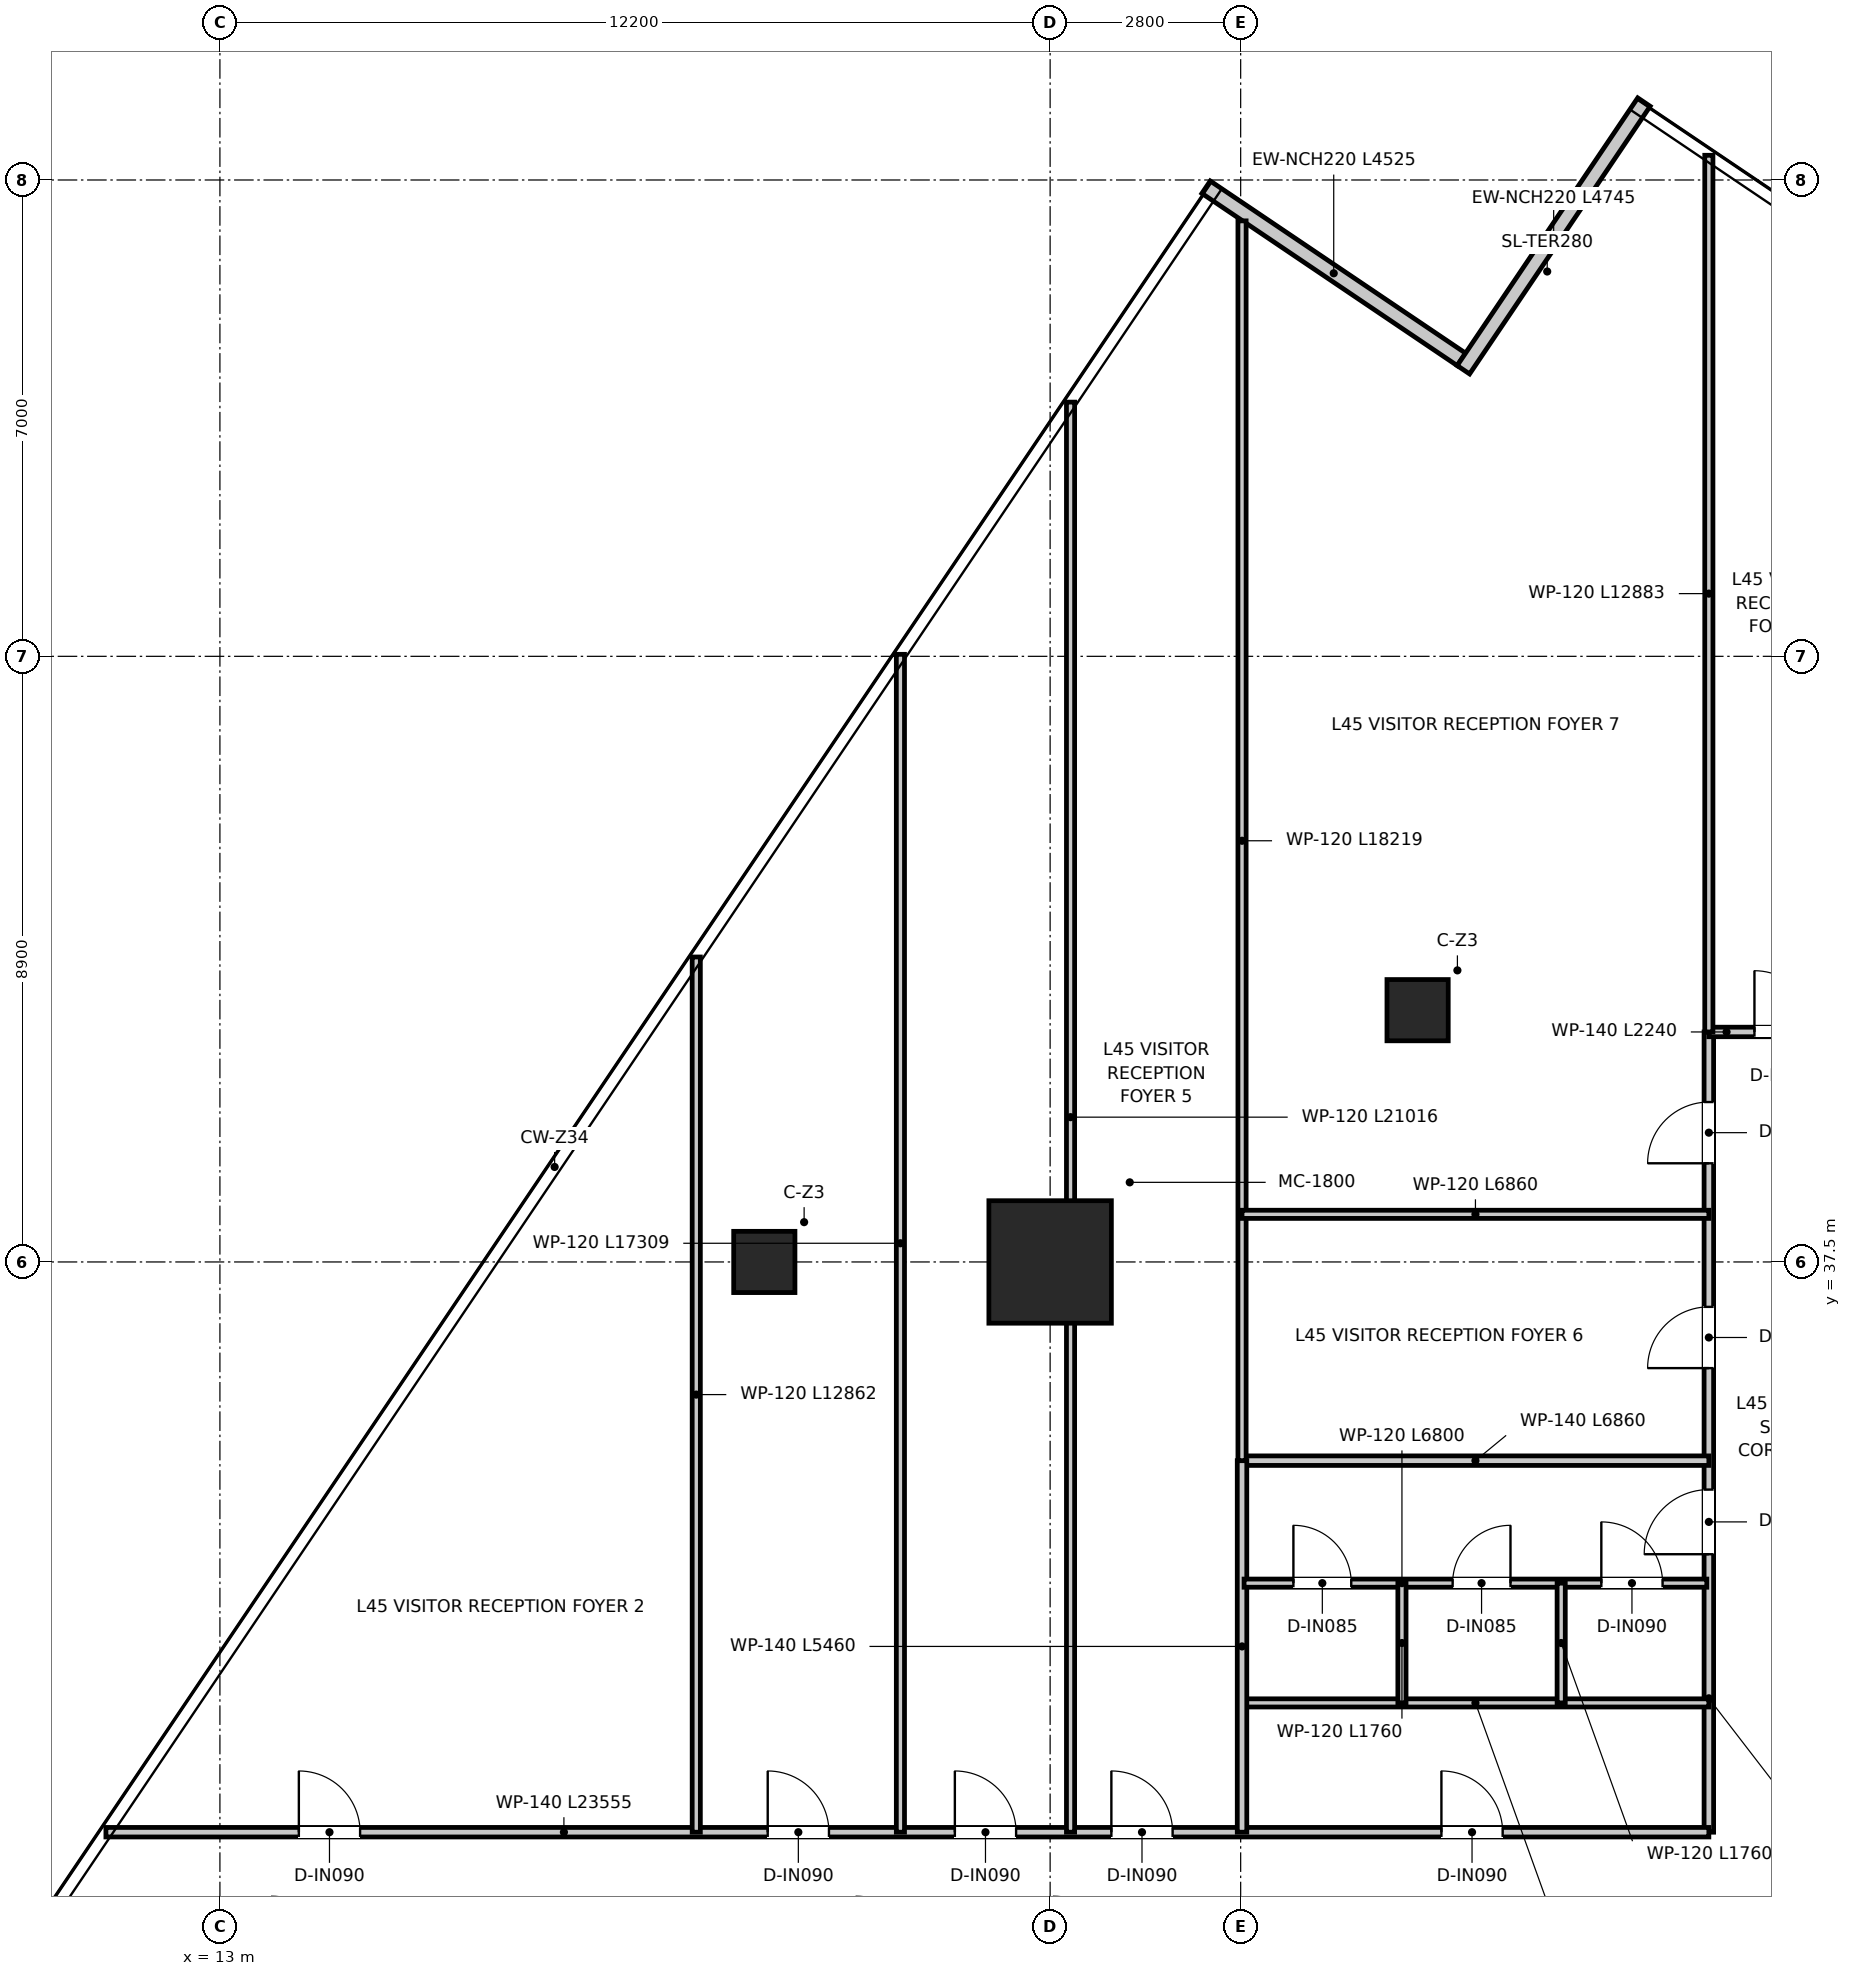
"""IFC4 building model, lengths in metres.
Left out: names, types, materials, properties, quantities, classifications, styles, units other than length and angle.
Written with IfcOpenShell. Run it as: python <this file> out.ifc"""

import sys

from ifc_helpers import new_model, si_unit, direction, frame, frame_2d, origin, origin_2d, place, context, subcontext, project, spatial, rectangle, extrude, source, transform, mapped, element, fill, save


model = new_model("IFC4")
c1 = context("Model", 3, precision=1e-05, world=origin(), true_north=direction((0.0, 1.0)))
c2 = subcontext(c1, "Body", "Model", "MODEL_VIEW")
j1 = project(units=[si_unit("LENGTHUNIT", "METRE"), si_unit("PLANEANGLEUNIT", "RADIAN")], contexts=[c1])
p1 = place(None, origin())
s1 = spatial("IfcSite", under=j1, at=p1, CompositionType="ELEMENT")
p2 = place(p1, origin())
s2 = spatial("IfcBuilding", under=s1, at=p2, CompositionType="ELEMENT")
p3 = place(p2, frame((0.0, 0.0, 185.7)))
s3 = spatial("IfcBuildingStorey", under=s2, at=p3, CompositionType="ELEMENT", Elevation=185.7)
m1 = source(origin(), c2, "Body", "SweptSolid", [
    extrude(rectangle(XDim=1.8, YDim=1.8, at=origin_2d()), origin(), (0.0, 0.0, 1.0), 3.95),
])
p4 = place(p3, frame((25.2, 37.5, 0.0), z_axis=(0.0, 0.0, 1.0), x_axis=(1.0, 0.0, 0.0)))
e1 = element("IfcColumn", 1, at=p4, inside=s3, PredefinedType="USERDEFINED", context=c2, shape_type="MappedRepresentation", body=[
    mapped(m1, transform((0.0, 0.0, 0.0), x_axis=(1.0, 0.0, 0.0), y_axis=(0.0, 1.0, 0.0), z_axis=(0.0, 0.0, 1.0), scale=1.0)),
])
m2 = source(origin(), c2, "Body", "SweptSolid", [
    extrude(rectangle(XDim=0.9, YDim=0.9, at=origin_2d()), origin(), (0.0, 0.0, 1.0), 3.95),
])
for number, where, z_axis, x_axis in (
    (2, (21.0, 37.5, 0.0), (0.0, 0.0, 1.0), (1.0, 0.0, 0.0)),
    (3, (30.6, 41.2, 0.0), (0.0, 0.0, 1.0), (1.0, 0.0, 0.0)),
):
    element("IfcColumn", number, at=place(p3, frame(where, z_axis=z_axis, x_axis=x_axis)), inside=s3, PredefinedType="COLUMN", context=c2, shape_type="MappedRepresentation", body=[
        mapped(m2, transform((0.0, 0.0, 0.0), x_axis=(1.0, 0.0, 0.0), y_axis=(0.0, 1.0, 0.0), z_axis=(0.0, 0.0, 1.0), scale=1.0)),
    ])
p5 = place(p3, frame((31.243, 50.764, 0.0), z_axis=(0.0, 0.0, 1.0), x_axis=(-0.829025013232, 0.559211522982, 0.0)))
e4 = element("IfcWall", 4, at=p5, inside=s3, PredefinedType="ELEMENTEDWALL", context=c2, shape_type="SweptSolid", body=[
    extrude(rectangle(XDim=4.525, YDim=0.22, at=frame_2d((2.263, 0.0))), origin(), (0.0, 0.0, 1.0), 3.67),
])
p6 = place(p3, frame((33.926, 54.545, 0.0), z_axis=(0.0, 0.0, 1.0), x_axis=(-0.559180323614, -0.829046057637, 0.0)))
e5 = element("IfcWall", 5, at=p6, inside=s3, PredefinedType="ELEMENTEDWALL", context=c2, shape_type="SweptSolid", body=[
    extrude(rectangle(XDim=4.745, YDim=0.22, at=frame_2d((2.373, 0.0))), origin(), (0.0, 0.0, 1.0), 3.67),
])
p7 = place(p3, frame((34.88, 29.12, 0.0), z_axis=(0.0, 0.0, 1.0), x_axis=(0.0, 1.0, 0.0)))
e6 = element("IfcWall", 6, at=p7, inside=s3, PredefinedType="PARTITIONING", context=c2, shape_type="SweptSolid", body=[
    extrude(rectangle(XDim=11.76, YDim=0.14, at=frame_2d((5.88, 0.0))), origin(), (0.0, 0.0, 1.0), 3.03),
])
p8 = place(p7, frame((4.085, 0.0, 0.0)))
e7 = element("IfcOpeningElement", 7, at=p8, cuts=e6, PredefinedType="OPENING", context=c2, shape_type="SweptSolid", body=[
    extrude(rectangle(XDim=0.95, YDim=2.1, at=frame_2d((0.475, 1.05))), frame((0.0, 0.08, 0.0), z_axis=(0.0, -1.0, 0.0), x_axis=(1.0, 0.0, 0.0)), (0.0, 0.0, 1.0), 0.16),
])
p9 = place(p7, frame((6.82, 0.0, 0.0)))
e8 = element("IfcOpeningElement", 8, at=p9, cuts=e6, PredefinedType="OPENING", context=c2, shape_type="SweptSolid", body=[
    extrude(rectangle(XDim=0.9, YDim=2.1, at=frame_2d((0.45, 1.05))), frame((0.0, 0.08, 0.0), z_axis=(0.0, -1.0, 0.0), x_axis=(1.0, 0.0, 0.0)), (0.0, 0.0, 1.0), 0.16),
])
p10 = place(p7, frame((9.83, 0.0, 0.0)))
e9 = element("IfcOpeningElement", 9, at=p10, cuts=e6, PredefinedType="OPENING", context=c2, shape_type="SweptSolid", body=[
    extrude(rectangle(XDim=0.9, YDim=2.1, at=frame_2d((0.45, 1.05))), frame((0.0, 0.08, 0.0), z_axis=(0.0, -1.0, 0.0), x_axis=(1.0, 0.0, 0.0)), (0.0, 0.0, 1.0), 0.16),
])
p11 = place(p3, frame((34.88, 40.88, 0.0), z_axis=(0.0, 0.0, 1.0), x_axis=(1.0, 0.0, 0.0)))
e10 = element("IfcWall", 10, at=p11, inside=s3, PredefinedType="PARTITIONING", context=c2, shape_type="SweptSolid", body=[
    extrude(rectangle(XDim=2.24, YDim=0.14, at=frame_2d((1.12, 0.0))), origin(), (0.0, 0.0, 1.0), 3.67),
])
p12 = place(p11, frame((0.67, 0.0, 0.0)))
e11 = element("IfcOpeningElement", 11, at=p12, cuts=e10, PredefinedType="OPENING", context=c2, shape_type="SweptSolid", body=[
    extrude(rectangle(XDim=0.9, YDim=2.1, at=frame_2d((0.45, 1.05))), frame((0.0, 0.08, 0.0), z_axis=(0.0, -1.0, 0.0), x_axis=(1.0, 0.0, 0.0)), (0.0, 0.0, 1.0), 0.16),
])
p13 = place(p3, frame((11.325, 29.12, 0.0), z_axis=(0.0, 0.0, 1.0), x_axis=(1.0, 0.0, 0.0)))
e12 = element("IfcWall", 12, at=p13, inside=s3, PredefinedType="PARTITIONING", context=c2, shape_type="SweptSolid", body=[
    extrude(rectangle(XDim=23.555, YDim=0.14, at=frame_2d((11.778, 0.0))), origin(), (0.0, 0.0, 1.0), 3.03),
])
p14 = place(p13, frame((19.625, 0.0, 0.0)))
e13 = element("IfcOpeningElement", 13, at=p14, cuts=e12, PredefinedType="OPENING", context=c2, shape_type="SweptSolid", body=[
    extrude(rectangle(XDim=0.9, YDim=2.1, at=frame_2d((0.45, 1.05))), frame((0.0, 0.08, 0.0), z_axis=(0.0, -1.0, 0.0), x_axis=(1.0, 0.0, 0.0)), (0.0, 0.0, 1.0), 0.16),
])
p15 = place(p13, frame((2.835, 0.0, 0.0)))
e14 = element("IfcOpeningElement", 14, at=p15, cuts=e12, PredefinedType="OPENING", context=c2, shape_type="SweptSolid", body=[
    extrude(rectangle(XDim=0.9, YDim=2.1, at=frame_2d((0.45, 1.05))), frame((0.0, 0.08, 0.0), z_axis=(0.0, -1.0, 0.0), x_axis=(1.0, 0.0, 0.0)), (0.0, 0.0, 1.0), 0.16),
])
p16 = place(p13, frame((9.725, 0.0, 0.0)))
e15 = element("IfcOpeningElement", 15, at=p16, cuts=e12, PredefinedType="OPENING", context=c2, shape_type="SweptSolid", body=[
    extrude(rectangle(XDim=0.9, YDim=2.1, at=frame_2d((0.45, 1.05))), frame((0.0, 0.08, 0.0), z_axis=(0.0, -1.0, 0.0), x_axis=(1.0, 0.0, 0.0)), (0.0, 0.0, 1.0), 0.16),
])
p17 = place(p13, frame((12.475, 0.0, 0.0)))
e16 = element("IfcOpeningElement", 16, at=p17, cuts=e12, PredefinedType="OPENING", context=c2, shape_type="SweptSolid", body=[
    extrude(rectangle(XDim=0.9, YDim=2.1, at=frame_2d((0.45, 1.05))), frame((0.0, 0.08, 0.0), z_axis=(0.0, -1.0, 0.0), x_axis=(1.0, 0.0, 0.0)), (0.0, 0.0, 1.0), 0.16),
])
p18 = place(p13, frame((14.775, 0.0, 0.0)))
e17 = element("IfcOpeningElement", 17, at=p18, cuts=e12, PredefinedType="OPENING", context=c2, shape_type="SweptSolid", body=[
    extrude(rectangle(XDim=0.9, YDim=2.1, at=frame_2d((0.45, 1.05))), frame((0.0, 0.08, 0.0), z_axis=(0.0, -1.0, 0.0), x_axis=(1.0, 0.0, 0.0)), (0.0, 0.0, 1.0), 0.16),
])
p19 = place(p3, frame((28.02, 31.02, 0.0), z_axis=(0.0, 0.0, 1.0), x_axis=(1.0, 0.0, 0.0)))
e18 = element("IfcWall", 18, at=p19, inside=s3, PredefinedType="PARTITIONING", context=c2, shape_type="SweptSolid", body=[
    extrude(rectangle(XDim=6.86, YDim=0.12, at=frame_2d((3.43, 0.0))), origin(), (0.0, 0.0, 1.0), 3.08),
])
p20 = place(p3, frame((28.02, 34.58, 0.0), z_axis=(0.0, 0.0, 1.0), x_axis=(1.0, 0.0, 0.0)))
e19 = element("IfcWall", 19, at=p20, inside=s3, PredefinedType="PARTITIONING", context=c2, shape_type="SweptSolid", body=[
    extrude(rectangle(XDim=6.86, YDim=0.14, at=frame_2d((3.43, 0.0))), origin(), (0.0, 0.0, 1.0), 3.08),
])
p21 = place(p3, frame((28.02, 29.12, 0.0), z_axis=(0.0, 0.0, 1.0), x_axis=(0.0, 1.0, 0.0)))
e20 = element("IfcWall", 20, at=p21, inside=s3, PredefinedType="PARTITIONING", context=c2, shape_type="SweptSolid", body=[
    extrude(rectangle(XDim=5.46, YDim=0.14, at=frame_2d((2.73, 0.0))), origin(), (0.0, 0.0, 1.0), 3.31),
])
p22 = place(p3, frame((28.05, 32.78, 0.0), z_axis=(0.0, 0.0, 1.0), x_axis=(1.0, 0.0, 0.0)))
e21 = element("IfcWall", 21, at=p22, inside=s3, PredefinedType="PARTITIONING", context=c2, shape_type="SweptSolid", body=[
    extrude(rectangle(XDim=6.8, YDim=0.12, at=frame_2d((3.4, 0.0))), origin(), (0.0, 0.0, 1.0), 3.08),
])
p23 = place(p22, frame((0.725, 0.0, 0.0)))
e22 = element("IfcOpeningElement", 22, at=p23, cuts=e21, PredefinedType="OPENING", context=c2, shape_type="SweptSolid", body=[
    extrude(rectangle(XDim=0.85, YDim=2.1, at=frame_2d((0.425, 1.05))), frame((0.0, 0.07, 0.0), z_axis=(0.0, -1.0, 0.0), x_axis=(1.0, 0.0, 0.0)), (0.0, 0.0, 1.0), 0.14),
])
p24 = place(p22, frame((3.065, 0.0, 0.0)))
e23 = element("IfcOpeningElement", 23, at=p24, cuts=e21, PredefinedType="OPENING", context=c2, shape_type="SweptSolid", body=[
    extrude(rectangle(XDim=0.85, YDim=2.1, at=frame_2d((0.425, 1.05))), frame((0.0, 0.07, 0.0), z_axis=(0.0, -1.0, 0.0), x_axis=(1.0, 0.0, 0.0)), (0.0, 0.0, 1.0), 0.14),
])
p25 = place(p22, frame((5.25, 0.0, 0.0)))
e24 = element("IfcOpeningElement", 24, at=p25, cuts=e21, PredefinedType="OPENING", context=c2, shape_type="SweptSolid", body=[
    extrude(rectangle(XDim=0.9, YDim=2.1, at=frame_2d((0.45, 1.05))), frame((0.0, 0.07, 0.0), z_axis=(0.0, -1.0, 0.0), x_axis=(1.0, 0.0, 0.0)), (0.0, 0.0, 1.0), 0.14),
])
p26 = place(p3, frame((30.37, 31.02, 0.0), z_axis=(0.0, 0.0, 1.0), x_axis=(0.0, 1.0, 0.0)))
e25 = element("IfcWall", 25, at=p26, inside=s3, PredefinedType="PARTITIONING", context=c2, shape_type="SweptSolid", body=[
    extrude(rectangle(XDim=1.76, YDim=0.12, at=frame_2d((0.88, 0.0))), origin(), (0.0, 0.0, 1.0), 3.08),
])
p27 = place(p3, frame((32.71, 31.02, 0.0), z_axis=(0.0, 0.0, 1.0), x_axis=(0.0, 1.0, 0.0)))
e26 = element("IfcWall", 26, at=p27, inside=s3, PredefinedType="PARTITIONING", context=c2, shape_type="SweptSolid", body=[
    extrude(rectangle(XDim=1.76, YDim=0.12, at=frame_2d((0.88, 0.0))), origin(), (0.0, 0.0, 1.0), 3.67),
])
p28 = place(p3, frame((34.88, 40.88, 0.0), z_axis=(0.0, 0.0, 1.0), x_axis=(0.0, 1.0, 0.0)))
e27 = element("IfcWall", 27, at=p28, inside=s3, PredefinedType="PARTITIONING", context=c2, shape_type="SweptSolid", body=[
    extrude(rectangle(XDim=12.883, YDim=0.12, at=frame_2d((6.442, 0.0))), origin(), (0.0, 0.0, 1.0), 3.28),
])
p29 = place(p3, frame((20.0, 29.12, 0.0), z_axis=(0.0, 0.0, 1.0), x_axis=(0.0, 1.0, 0.0)))
e28 = element("IfcWall", 28, at=p29, inside=s3, PredefinedType="PARTITIONING", context=c2, shape_type="SweptSolid", body=[
    extrude(rectangle(XDim=12.862, YDim=0.12, at=frame_2d((6.431, 0.0))), origin(), (0.0, 0.0, 1.0), 3.67),
])
p30 = place(p3, frame((23.0, 29.12, 0.0), z_axis=(0.0, 0.0, 1.0), x_axis=(0.0, 1.0, 0.0)))
e29 = element("IfcWall", 29, at=p30, inside=s3, PredefinedType="PARTITIONING", context=c2, shape_type="SweptSolid", body=[
    extrude(rectangle(XDim=17.309, YDim=0.12, at=frame_2d((8.655, 0.0))), origin(), (0.0, 0.0, 1.0), 3.08),
])
p31 = place(p3, frame((25.5, 29.12, 0.0), z_axis=(0.0, 0.0, 1.0), x_axis=(0.0, 1.0, 0.0)))
e30 = element("IfcWall", 30, at=p31, inside=s3, PredefinedType="PARTITIONING", context=c2, shape_type="SweptSolid", body=[
    extrude(rectangle(XDim=21.016, YDim=0.12, at=frame_2d((10.508, 0.0))), origin(), (0.0, 0.0, 1.0), 3.03),
])
p32 = place(p3, frame((28.02, 34.58, 0.0), z_axis=(0.0, 0.0, 1.0), x_axis=(0.0, 1.0, 0.0)))
e31 = element("IfcWall", 31, at=p32, inside=s3, PredefinedType="PARTITIONING", context=c2, shape_type="SweptSolid", body=[
    extrude(rectangle(XDim=18.219, YDim=0.12, at=frame_2d((9.11, 0.0))), origin(), (0.0, 0.0, 1.0), 3.03),
])
p33 = place(p3, frame((28.02, 38.2, 0.0), z_axis=(0.0, 0.0, 1.0), x_axis=(1.0, 0.0, 0.0)))
e32 = element("IfcWall", 32, at=p33, inside=s3, PredefinedType="PARTITIONING", context=c2, shape_type="SweptSolid", body=[
    extrude(rectangle(XDim=6.86, YDim=0.12, at=frame_2d((3.43, 0.0))), origin(), (0.0, 0.0, 1.0), 3.08),
])
p34 = place(p14, origin())
e33 = element("IfcDoor", 33, at=p34, inside=s3, OperationType="SINGLE_SWING_LEFT", PredefinedType="DOOR", context=c2, shape_type="SweptSolid", body=[
    extrude(rectangle(XDim=0.9, YDim=2.1, at=frame_2d((0.45, 1.05))), frame((0.0, 0.025, 0.0), z_axis=(0.0, -1.0, 0.0), x_axis=(1.0, 0.0, 0.0)), (0.0, 0.0, 1.0), 0.05),
])
fill(e13, e33)
p35 = place(p8, origin())
e34 = element("IfcDoor", 34, at=p35, inside=s3, OperationType="SINGLE_SWING_LEFT", PredefinedType="DOOR", context=c2, shape_type="SweptSolid", body=[
    extrude(rectangle(XDim=0.95, YDim=2.1, at=frame_2d((0.475, 1.05))), frame((0.0, 0.025, 0.0), z_axis=(0.0, -1.0, 0.0), x_axis=(1.0, 0.0, 0.0)), (0.0, 0.0, 1.0), 0.05),
])
fill(e7, e34)
p36 = place(p23, origin())
e35 = element("IfcDoor", 35, at=p36, inside=s3, OperationType="SINGLE_SWING_LEFT", PredefinedType="DOOR", context=c2, shape_type="SweptSolid", body=[
    extrude(rectangle(XDim=0.85, YDim=2.1, at=frame_2d((0.425, 1.05))), frame((0.0, 0.025, 0.0), z_axis=(0.0, -1.0, 0.0), x_axis=(1.0, 0.0, 0.0)), (0.0, 0.0, 1.0), 0.05),
])
fill(e22, e35)
p37 = place(p24, origin())
e36 = element("IfcDoor", 36, at=p37, inside=s3, OperationType="SINGLE_SWING_RIGHT", PredefinedType="DOOR", context=c2, shape_type="SweptSolid", body=[
    extrude(rectangle(XDim=0.85, YDim=2.1, at=frame_2d((0.425, 1.05))), frame((0.0, 0.025, 0.0), z_axis=(0.0, -1.0, 0.0), x_axis=(1.0, 0.0, 0.0)), (0.0, 0.0, 1.0), 0.05),
])
fill(e23, e36)
p38 = place(p25, origin())
e37 = element("IfcDoor", 37, at=p38, inside=s3, OperationType="SINGLE_SWING_LEFT", PredefinedType="DOOR", context=c2, shape_type="SweptSolid", body=[
    extrude(rectangle(XDim=0.9, YDim=2.1, at=frame_2d((0.45, 1.05))), frame((0.0, 0.025, 0.0), z_axis=(0.0, -1.0, 0.0), x_axis=(1.0, 0.0, 0.0)), (0.0, 0.0, 1.0), 0.05),
])
fill(e24, e37)
p39 = place(p12, origin())
e38 = element("IfcDoor", 38, at=p39, inside=s3, OperationType="SINGLE_SWING_LEFT", PredefinedType="DOOR", context=c2, shape_type="SweptSolid", body=[
    extrude(rectangle(XDim=0.9, YDim=2.1, at=frame_2d((0.45, 1.05))), frame((0.0, 0.025, 0.0), z_axis=(0.0, -1.0, 0.0), x_axis=(1.0, 0.0, 0.0)), (0.0, 0.0, 1.0), 0.05),
])
fill(e11, e38)
p40 = place(p15, origin())
e39 = element("IfcDoor", 39, at=p40, inside=s3, OperationType="SINGLE_SWING_LEFT", PredefinedType="DOOR", context=c2, shape_type="SweptSolid", body=[
    extrude(rectangle(XDim=0.9, YDim=2.1, at=frame_2d((0.45, 1.05))), frame((0.0, 0.025, 0.0), z_axis=(0.0, -1.0, 0.0), x_axis=(1.0, 0.0, 0.0)), (0.0, 0.0, 1.0), 0.05),
])
fill(e14, e39)
p41 = place(p16, origin())
e40 = element("IfcDoor", 40, at=p41, inside=s3, OperationType="SINGLE_SWING_LEFT", PredefinedType="DOOR", context=c2, shape_type="SweptSolid", body=[
    extrude(rectangle(XDim=0.9, YDim=2.1, at=frame_2d((0.45, 1.05))), frame((0.0, 0.025, 0.0), z_axis=(0.0, -1.0, 0.0), x_axis=(1.0, 0.0, 0.0)), (0.0, 0.0, 1.0), 0.05),
])
fill(e15, e40)
p42 = place(p17, origin())
e41 = element("IfcDoor", 41, at=p42, inside=s3, OperationType="SINGLE_SWING_LEFT", PredefinedType="DOOR", context=c2, shape_type="SweptSolid", body=[
    extrude(rectangle(XDim=0.9, YDim=2.1, at=frame_2d((0.45, 1.05))), frame((0.0, 0.025, 0.0), z_axis=(0.0, -1.0, 0.0), x_axis=(1.0, 0.0, 0.0)), (0.0, 0.0, 1.0), 0.05),
])
fill(e16, e41)
p43 = place(p18, origin())
e42 = element("IfcDoor", 42, at=p43, inside=s3, OperationType="SINGLE_SWING_LEFT", PredefinedType="DOOR", context=c2, shape_type="SweptSolid", body=[
    extrude(rectangle(XDim=0.9, YDim=2.1, at=frame_2d((0.45, 1.05))), frame((0.0, 0.025, 0.0), z_axis=(0.0, -1.0, 0.0), x_axis=(1.0, 0.0, 0.0)), (0.0, 0.0, 1.0), 0.05),
])
fill(e17, e42)
p44 = place(p9, origin())
e43 = element("IfcDoor", 43, at=p44, inside=s3, OperationType="SINGLE_SWING_LEFT", PredefinedType="DOOR", context=c2, shape_type="SweptSolid", body=[
    extrude(rectangle(XDim=0.9, YDim=2.1, at=frame_2d((0.45, 1.05))), frame((0.0, 0.025, 0.0), z_axis=(0.0, -1.0, 0.0), x_axis=(1.0, 0.0, 0.0)), (0.0, 0.0, 1.0), 0.05),
])
fill(e8, e43)
p45 = place(p10, origin())
e44 = element("IfcDoor", 44, at=p45, inside=s3, OperationType="SINGLE_SWING_LEFT", PredefinedType="DOOR", context=c2, shape_type="SweptSolid", body=[
    extrude(rectangle(XDim=0.9, YDim=2.1, at=frame_2d((0.45, 1.05))), frame((0.0, 0.025, 0.0), z_axis=(0.0, -1.0, 0.0), x_axis=(1.0, 0.0, 0.0)), (0.0, 0.0, 1.0), 0.05),
])
fill(e9, e44)
save(model, sys.argv[1])
